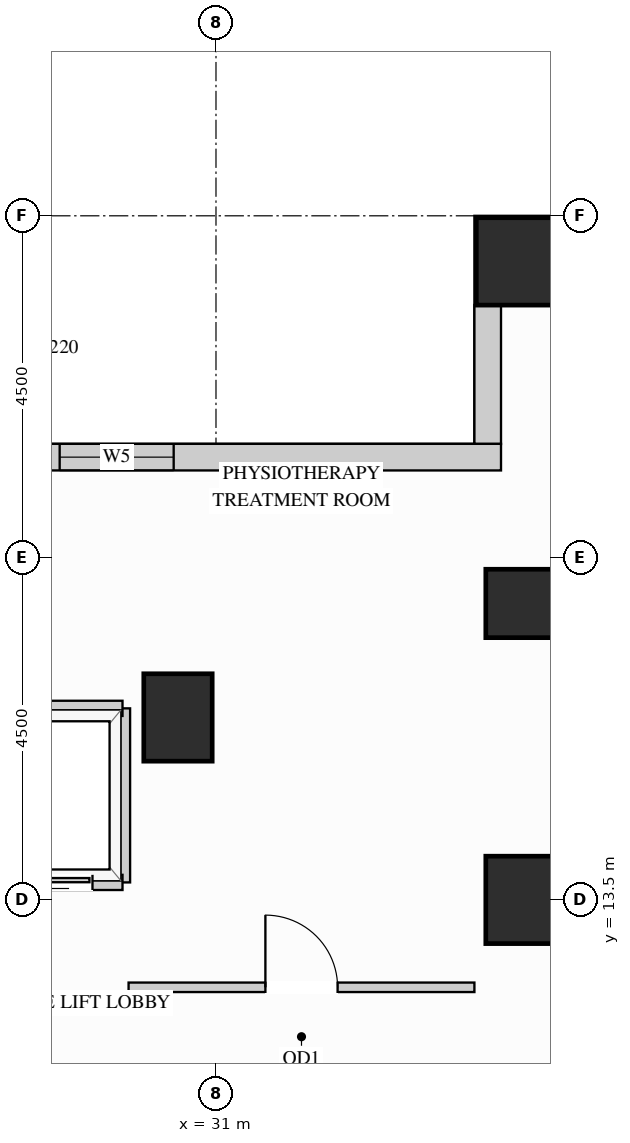
"""IFC4 building model, lengths in metres.
Left out: names, types, materials, properties, quantities, classifications, styles, units other than length and angle.
Written with IfcOpenShell. Run it as: python <this file> out.ifc"""

import sys

from ifc_helpers import new_model, si_unit, direction, frame, frame_2d, origin, origin_2d, place, context, subcontext, project, spatial, rectangle, extrude, source, transform, mapped, element, fill, save


model = new_model("IFC4")
c1 = context("Model", 3, precision=1e-05, world=origin(), true_north=direction((0.0, 1.0)))
c2 = subcontext(c1, "Body", "Model", "MODEL_VIEW")
j1 = project(units=[si_unit("LENGTHUNIT", "METRE"), si_unit("PLANEANGLEUNIT", "RADIAN")], contexts=[c1])
p1 = place(None, origin())
s1 = spatial("IfcSite", under=j1, at=p1, CompositionType="ELEMENT")
p2 = place(p1, origin())
s2 = spatial("IfcBuilding", under=s1, at=p2, CompositionType="ELEMENT")
p3 = place(p2, frame((0.0, 0.0, 91.8)))
s3 = spatial("IfcBuildingStorey", under=s2, at=p3, CompositionType="ELEMENT", Elevation=91.8)
m1 = source(origin(), c2, "Body", "SweptSolid", [
    extrude(rectangle(XDim=0.9, YDim=0.9, at=origin_2d()), origin(), (0.0, 0.0, 1.0), 3.38),
])
p4 = place(p3, frame((35.0, 17.4, 0.0), z_axis=(0.0, 0.0, 1.0), x_axis=(1.0, 0.0, 0.0)))
e1 = element("IfcColumn", 1, at=p4, inside=s3, PredefinedType="COLUMN", context=c2, shape_type="MappedRepresentation", body=[
    mapped(m1, transform((0.0, 0.0, 0.0), x_axis=(1.0, 0.0, 0.0), y_axis=(0.0, 1.0, 0.0), z_axis=(0.0, 0.0, 1.0))),
])
m2 = source(origin(), c2, "Body", "SweptSolid", [
    extrude(rectangle(XDim=0.9, YDim=1.15, at=origin_2d()), origin(), (0.0, 0.0, 1.0), 3.38),
])
for number, where, z_axis, x_axis in (
    (2, (35.0, 13.5, 0.0), (0.0, 0.0, 1.0), (1.0, 0.0, 0.0)),
    (3, (30.5, 15.9, 0.0), (0.0, 0.0, 1.0), (1.0, 0.0, 0.0)),
):
    element("IfcColumn", number, at=place(p3, frame(where, z_axis=z_axis, x_axis=x_axis)), inside=s3, PredefinedType="COLUMN", context=c2, shape_type="MappedRepresentation", body=[
        mapped(m2, transform((0.0, 0.0, 0.0), x_axis=(1.0, 0.0, 0.0), y_axis=(0.0, 1.0, 0.0), z_axis=(0.0, 0.0, 1.0))),
    ])
m3 = source(origin(), c2, "Body", "SweptSolid", [
    extrude(rectangle(XDim=1.15, YDim=1.15, at=origin_2d()), origin(), (0.0, 0.0, 1.0), 3.38),
])
p5 = place(p3, frame((35.0, 21.9, 0.0), z_axis=(0.0, 0.0, 1.0), x_axis=(1.0, 0.0, 0.0)))
e4 = element("IfcColumn", 4, at=p5, inside=s3, PredefinedType="COLUMN", context=c2, shape_type="MappedRepresentation", body=[
    mapped(m3, transform((0.0, 0.0, 0.0), x_axis=(1.0, 0.0, 0.0), y_axis=(0.0, 1.0, 0.0), z_axis=(0.0, 0.0, 1.0))),
])
m4 = source(origin(), c2, "Body", "SweptSolid", [
    extrude(rectangle(XDim=1.829, YDim=0.35, at=frame_2d((0.915, 0.0))), origin(), (0.0, 0.0, 1.0), 3.365),
])
p6 = place(p3, frame((34.575, 21.327, 0.0), z_axis=(0.0, 0.0, 1.0), x_axis=(0.0, -1.0, 0.0)))
e5 = element("IfcWall", 5, at=p6, inside=s3, PredefinedType="SOLIDWALL", context=c2, shape_type="MappedRepresentation", body=[
    mapped(m4, transform((0.0, 0.0, 0.0), x_axis=(1.0, 0.0, 0.0), y_axis=(0.0, 1.0, 0.0), z_axis=(0.0, 0.0, 1.0))),
])
p7 = place(p3, frame((34.75, 19.325, 0.0), z_axis=(0.0, 0.0, 1.0), x_axis=(-1.0, 0.0, 0.0)))
e6 = element("IfcWall", 6, at=p7, inside=s3, PredefinedType="SOLIDWALL", context=c2, shape_type="SweptSolid", body=[
    extrude(rectangle(XDim=15.6, YDim=0.35, at=frame_2d((7.8, 0.0))), origin(), (0.0, 0.0, 1.0), 3.365),
])
p8 = place(p7, frame((4.307, 0.0, 0.78)))
e7 = element("IfcOpeningElement", 7, at=p8, cuts=e6, PredefinedType="OPENING", context=c2, shape_type="SweptSolid", body=[
    extrude(rectangle(XDim=1.5, YDim=2.0, at=frame_2d((0.75, 1.0))), frame((0.0, 0.185, 0.0), z_axis=(0.0, -1.0, 0.0), x_axis=(1.0, 0.0, 0.0)), (0.0, 0.0, 1.0), 0.37),
])
p9 = place(p7, frame((9.793, 0.0, 0.78)))
e8 = element("IfcOpeningElement", 8, at=p9, cuts=e6, PredefinedType="OPENING", context=c2, shape_type="SweptSolid", body=[
    extrude(rectangle(XDim=1.5, YDim=2.0, at=frame_2d((0.75, 1.0))), frame((0.0, 0.185, 0.0), z_axis=(0.0, -1.0, 0.0), x_axis=(1.0, 0.0, 0.0)), (0.0, 0.0, 1.0), 0.37),
])
p10 = place(p3, frame((29.85, 12.35, 0.0), z_axis=(0.0, 0.0, 1.0), x_axis=(1.0, 0.0, 0.0)))
e9 = element("IfcWall", 9, at=p10, inside=s3, PredefinedType="PARTITIONING", context=c2, shape_type="SweptSolid", body=[
    extrude(rectangle(XDim=4.55, YDim=0.125, at=frame_2d((2.275, 0.0))), origin(), (0.0, 0.0, 1.0), 3.365),
])
p11 = place(p10, frame((1.8, 0.0, 0.0)))
e10 = element("IfcOpeningElement", 10, at=p11, cuts=e9, PredefinedType="OPENING", context=c2, shape_type="SweptSolid", body=[
    extrude(rectangle(XDim=0.95, YDim=2.15, at=frame_2d((0.475, 1.075))), frame((0.0, 0.073, 0.0), z_axis=(0.0, -1.0, 0.0), x_axis=(1.0, 0.0, 0.0)), (0.0, 0.0, 1.0), 0.145),
])
m5 = source(origin(), c2, "Body", "SweptSolid", [
    extrude(rectangle(XDim=2.29, YDim=0.2, at=frame_2d((1.145, 0.0))), origin(), (0.0, 0.0, 1.0), 3.365),
])
p12 = place(p3, frame((29.77, 13.73, 0.0), z_axis=(0.0, 0.0, 1.0), x_axis=(0.0, 1.0, 0.0)))
e11 = element("IfcWall", 11, at=p12, inside=s3, PredefinedType="PARTITIONING", context=c2, shape_type="MappedRepresentation", body=[
    mapped(m5, transform((0.0, 0.0, 0.0), x_axis=(1.0, 0.0, 0.0), y_axis=(0.0, 1.0, 0.0), z_axis=(0.0, 0.0, 1.0))),
])
m6 = source(origin(), c2, "Body", "SweptSolid", [
    extrude(rectangle(XDim=1.89, YDim=0.2, at=frame_2d((0.945, 0.0))), origin(), (0.0, 0.0, 1.0), 2.677),
])
p13 = place(p3, frame((27.88, 16.02, 0.0), z_axis=(0.0, 0.0, 1.0), x_axis=(1.0, 0.0, 0.0)))
e12 = element("IfcWall", 12, at=p13, inside=s3, PredefinedType="PARTITIONING", context=c2, shape_type="MappedRepresentation", body=[
    mapped(m6, transform((0.0, 0.0, 0.0), x_axis=(1.0, 0.0, 0.0), y_axis=(0.0, 1.0, 0.0), z_axis=(0.0, 0.0, 1.0))),
])
p14 = place(p3, frame((27.88, 13.73, 0.0), z_axis=(0.0, 0.0, 1.0), x_axis=(1.0, 0.0, 0.0)))
e13 = element("IfcWall", 13, at=p14, inside=s3, PredefinedType="PARTITIONING", context=c2, shape_type="SweptSolid", body=[
    extrude(rectangle(XDim=1.89, YDim=0.2, at=frame_2d((0.945, 0.0))), origin(), (0.0, 0.0, 1.0), 2.446),
])
p15 = place(p14, frame((0.395, 0.0, 0.0)))
e14 = element("IfcOpeningElement", 14, at=p15, cuts=e13, PredefinedType="OPENING", context=c2, shape_type="SweptSolid", body=[
    extrude(rectangle(XDim=1.1, YDim=2.2, at=frame_2d((0.55, 1.1))), frame((0.0, 0.11, 0.0), z_axis=(0.0, -1.0, 0.0), x_axis=(1.0, 0.0, 0.0)), (0.0, 0.0, 1.0), 0.22),
])
m7 = source(origin(), c2, "Body", "SweptSolid", [
    extrude(rectangle(XDim=1.1, YDim=2.2, at=frame_2d((0.55, 1.1))), frame((0.0, 0.025, 0.0), z_axis=(0.0, -1.0, 0.0), x_axis=(1.0, 0.0, 0.0)), (0.0, 0.0, 1.0), 0.05),
])
p16 = place(p15, origin())
e15 = element("IfcDoor", 15, at=p16, inside=s3, OperationType="SLIDING_TO_LEFT", PredefinedType="DOOR", context=c2, shape_type="MappedRepresentation", body=[
    mapped(m7, transform((0.0, 0.0, 0.0), x_axis=(1.0, 0.0, 0.0), y_axis=(0.0, 1.0, 0.0), z_axis=(0.0, 0.0, 1.0))),
])
fill(e14, e15)
m8 = source(origin(), c2, "Body", "SweptSolid", [
    extrude(rectangle(XDim=0.95, YDim=2.15, at=frame_2d((0.475, 1.075))), frame((0.0, 0.025, 0.0), z_axis=(0.0, -1.0, 0.0), x_axis=(1.0, 0.0, 0.0)), (0.0, 0.0, 1.0), 0.05),
])
p17 = place(p11, origin())
e16 = element("IfcDoor", 16, at=p17, inside=s3, OperationType="SINGLE_SWING_LEFT", PredefinedType="DOOR", context=c2, shape_type="MappedRepresentation", body=[
    mapped(m8, transform((0.0, 0.0, 0.0), x_axis=(1.0, 0.0, 0.0), y_axis=(0.0, 1.0, 0.0), z_axis=(0.0, 0.0, 1.0))),
])
fill(e10, e16)
m9 = source(origin(), c2, "Body", "SweptSolid", [
    extrude(rectangle(XDim=1.5, YDim=2.0, at=frame_2d((0.75, 1.0))), frame((0.0, 0.03, 0.0), z_axis=(0.0, -1.0, 0.0), x_axis=(1.0, 0.0, 0.0)), (0.0, 0.0, 1.0), 0.06),
])
p18 = place(p8, origin())
e17 = element("IfcWindow", 17, at=p18, inside=s3, PartitioningType="SINGLE_PANEL", PredefinedType="WINDOW", context=c2, shape_type="MappedRepresentation", body=[
    mapped(m9, transform((0.0, 0.0, 0.0), x_axis=(1.0, 0.0, 0.0), y_axis=(0.0, 1.0, 0.0), z_axis=(0.0, 0.0, 1.0))),
])
fill(e7, e17)
save(model, sys.argv[1])
